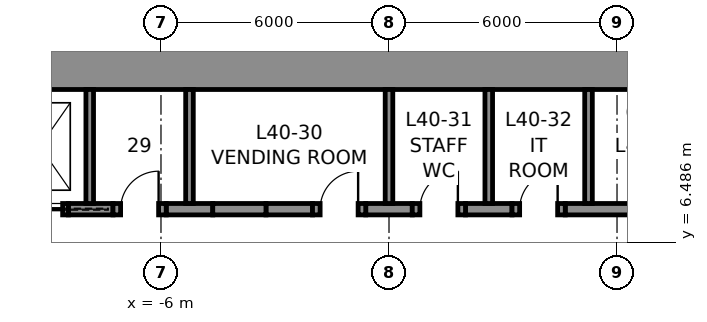
"""IFC4 building model, lengths in metres.
Left out: names, types, materials, properties, quantities, classifications, styles, units other than length and angle.
Written with IfcOpenShell. Run it as: python <this file> out.ifc"""

import sys

from ifc_helpers import new_model, si_unit, direction, frame, frame_2d, origin, place, context, subcontext, project, spatial, rectangle, extrude, element, fill, save


model = new_model("IFC4")
c1 = context("Model", 3, precision=1e-05, world=origin(), true_north=direction((0.0, 1.0)))
c2 = subcontext(c1, "Body", "Model", "MODEL_VIEW")
j1 = project(units=[si_unit("LENGTHUNIT", "METRE"), si_unit("PLANEANGLEUNIT", "RADIAN")], contexts=[c1])
p1 = place(None, origin())
s1 = spatial("IfcSite", under=j1, at=p1, CompositionType="ELEMENT")
p2 = place(p1, origin())
s2 = spatial("IfcBuilding", under=s1, at=p2, CompositionType="ELEMENT")
p3 = place(p2, frame((0.0, 0.0, 187.8)))
s3 = spatial("IfcBuildingStorey", under=s2, at=p3, CompositionType="ELEMENT", Elevation=187.8)
p4 = place(p3, frame((-12.0, 11.25, 0.0), z_axis=(0.0, 0.0, 1.0), x_axis=(1.0, 0.0, 0.0)))
e1 = element("IfcWall", 1, at=p4, inside=s3, PredefinedType="SHEAR", context=c2, shape_type="SweptSolid", body=[
    extrude(rectangle(XDim=24.0, YDim=1.5, at=frame_2d((12.0, 0.0))), origin(), (0.0, 0.0, 1.0), 4.0),
])
p5 = place(p3, frame((-8.438, 7.35, 0.0), z_axis=(0.0, 0.0, 1.0), x_axis=(1.0, 0.0, 0.0)))
e2 = element("IfcWall", 2, at=p5, inside=s3, PredefinedType="SHEAR", context=c2, shape_type="SweptSolid", body=[
    extrude(rectangle(XDim=1.175, YDim=0.3, at=frame_2d((0.587, 0.0))), origin(), (0.0, 0.0, 1.0), 4.0),
])
for number, where, z_axis, x_axis in (
    (3, (-5.863, 7.35, 0.0), (0.0, 0.0, 1.0), (1.0, 0.0, 0.0)),
    (4, (-3.238, 7.35, 0.0), (0.0, 0.0, 1.0), (1.0, 0.0, 0.0)),
    (5, (-0.613, 7.35, 0.0), (0.0, 0.0, 1.0), (1.0, 0.0, 0.0)),
    (6, (2.012, 7.35, 0.0), (0.0, 0.0, 1.0), (1.0, 0.0, 0.0)),
):
    element("IfcWall", number, at=place(p3, frame(where, z_axis=z_axis, x_axis=x_axis)), inside=s3, PredefinedType="SHEAR", context=c2, shape_type="SweptSolid", body=[
        extrude(rectangle(XDim=1.225, YDim=0.3, at=frame_2d((0.613, 0.0))), origin(), (0.0, 0.0, 1.0), 4.0),
    ])
p6 = place(p3, frame((4.637, 7.35, 0.0), z_axis=(0.0, 0.0, 1.0), x_axis=(1.0, 0.0, 0.0)))
e7 = element("IfcWall", 7, at=p6, inside=s3, PredefinedType="SHEAR", context=c2, shape_type="SweptSolid", body=[
    extrude(rectangle(XDim=1.887, YDim=0.3, at=frame_2d((0.944, 0.0))), origin(), (0.0, 0.0, 1.0), 4.0),
])
p7 = place(p3, frame((-9.938, 7.35, 0.0), z_axis=(0.0, 0.0, 1.0), x_axis=(1.0, 0.0, 0.0)))
e8 = element("IfcWall", 8, at=p7, inside=s3, PredefinedType="PARTITIONING", context=c2, shape_type="SweptSolid", body=[
    extrude(rectangle(XDim=1.5, YDim=0.3, at=frame_2d((0.75, 0.0))), origin(), (0.0, 0.0, 1.0), 4.0),
])
p8 = place(p7, frame((0.15, 0.0, 0.0)))
e9 = element("IfcOpeningElement", 9, at=p8, cuts=e8, PredefinedType="OPENING", context=c2, shape_type="SweptSolid", body=[
    extrude(rectangle(XDim=1.2, YDim=2.3, at=frame_2d((0.6, 1.15))), frame((0.0, 0.16, 0.0), z_axis=(0.0, -1.0, 0.0), x_axis=(1.0, 0.0, 0.0)), (0.0, 0.0, 1.0), 0.32),
])
p9 = place(p3, frame((-7.262, 7.35, 0.0), z_axis=(0.0, 0.0, 1.0), x_axis=(1.0, 0.0, 0.0)))
e10 = element("IfcWall", 10, at=p9, inside=s3, PredefinedType="PARTITIONING", context=c2, shape_type="SweptSolid", body=[
    extrude(rectangle(XDim=1.4, YDim=0.3, at=frame_2d((0.7, 0.0))), origin(), (0.0, 0.0, 1.0), 4.0),
])
p10 = place(p9, frame((0.2, 0.0, 0.0)))
e11 = element("IfcOpeningElement", 11, at=p10, cuts=e10, PredefinedType="OPENING", context=c2, shape_type="SweptSolid", body=[
    extrude(rectangle(XDim=1.0, YDim=2.3, at=frame_2d((0.5, 1.15))), frame((0.0, 0.16, 0.0), z_axis=(0.0, -1.0, 0.0), x_axis=(1.0, 0.0, 0.0)), (0.0, 0.0, 1.0), 0.32),
])
p11 = place(p3, frame((-4.637, 7.35, 0.0), z_axis=(0.0, 0.0, 1.0), x_axis=(1.0, 0.0, 0.0)))
e12 = element("IfcWall", 12, at=p11, inside=s3, PredefinedType="PARTITIONING", context=c2, shape_type="SweptSolid", body=[
    extrude(rectangle(XDim=1.4, YDim=0.3, at=frame_2d((0.7, 0.0))), origin(), (0.0, 0.0, 1.0), 4.0),
])
p12 = place(p3, frame((-2.012, 7.35, 0.0), z_axis=(0.0, 0.0, 1.0), x_axis=(1.0, 0.0, 0.0)))
e13 = element("IfcWall", 13, at=p12, inside=s3, PredefinedType="PARTITIONING", context=c2, shape_type="SweptSolid", body=[
    extrude(rectangle(XDim=1.4, YDim=0.3, at=frame_2d((0.7, 0.0))), origin(), (0.0, 0.0, 1.0), 4.0),
])
p13 = place(p12, frame((0.2, 0.0, 0.0)))
e14 = element("IfcOpeningElement", 14, at=p13, cuts=e13, PredefinedType="OPENING", context=c2, shape_type="SweptSolid", body=[
    extrude(rectangle(XDim=1.0, YDim=2.3, at=frame_2d((0.5, 1.15))), frame((0.0, 0.16, 0.0), z_axis=(0.0, -1.0, 0.0), x_axis=(1.0, 0.0, 0.0)), (0.0, 0.0, 1.0), 0.32),
])
p14 = place(p3, frame((0.613, 7.35, 0.0), z_axis=(0.0, 0.0, 1.0), x_axis=(1.0, 0.0, 0.0)))
e15 = element("IfcWall", 15, at=p14, inside=s3, PredefinedType="PARTITIONING", context=c2, shape_type="SweptSolid", body=[
    extrude(rectangle(XDim=1.4, YDim=0.3, at=frame_2d((0.7, 0.0))), origin(), (0.0, 0.0, 1.0), 4.0),
])
p15 = place(p14, frame((0.2, 0.0, 0.0)))
e16 = element("IfcOpeningElement", 16, at=p15, cuts=e15, PredefinedType="OPENING", context=c2, shape_type="SweptSolid", body=[
    extrude(rectangle(XDim=1.0, YDim=2.3, at=frame_2d((0.5, 1.15))), frame((0.0, 0.16, 0.0), z_axis=(0.0, -1.0, 0.0), x_axis=(1.0, 0.0, 0.0)), (0.0, 0.0, 1.0), 0.32),
])
p16 = place(p3, frame((3.238, 7.35, 0.0), z_axis=(0.0, 0.0, 1.0), x_axis=(1.0, 0.0, 0.0)))
e17 = element("IfcWall", 17, at=p16, inside=s3, PredefinedType="PARTITIONING", context=c2, shape_type="SweptSolid", body=[
    extrude(rectangle(XDim=1.4, YDim=0.3, at=frame_2d((0.7, 0.0))), origin(), (0.0, 0.0, 1.0), 4.0),
])
p17 = place(p16, frame((0.2, 0.0, 0.0)))
e18 = element("IfcOpeningElement", 18, at=p17, cuts=e17, PredefinedType="OPENING", context=c2, shape_type="SweptSolid", body=[
    extrude(rectangle(XDim=1.0, YDim=2.3, at=frame_2d((0.5, 1.15))), frame((0.0, 0.16, 0.0), z_axis=(0.0, -1.0, 0.0), x_axis=(1.0, 0.0, 0.0)), (0.0, 0.0, 1.0), 0.32),
])
for number, where, z_axis, x_axis in (
    (19, (-7.875, 7.5, 0.0), (0.0, 0.0, 1.0), (0.0, 1.0, 0.0)),
    (20, (-5.25, 7.5, 0.0), (0.0, 0.0, 1.0), (0.0, 1.0, 0.0)),
    (21, (0.0, 7.5, 0.0), (0.0, 0.0, 1.0), (0.0, 1.0, 0.0)),
    (22, (2.625, 7.5, 0.0), (0.0, 0.0, 1.0), (0.0, 1.0, 0.0)),
    (23, (5.25, 7.5, 0.0), (0.0, 0.0, 1.0), (0.0, 1.0, 0.0)),
):
    element("IfcWall", number, at=place(p3, frame(where, z_axis=z_axis, x_axis=x_axis)), inside=s3, PredefinedType="PARTITIONING", context=c2, shape_type="SweptSolid", body=[
        extrude(rectangle(XDim=3.0, YDim=0.2, at=frame_2d((1.5, 0.0))), origin(), (0.0, 0.0, 1.0), 4.0),
    ])
p18 = place(p10, origin())
e24 = element("IfcDoor", 24, at=p18, inside=s3, OperationType="SINGLE_SWING_RIGHT", PredefinedType="DOOR", context=c2, shape_type="SweptSolid", body=[
    extrude(rectangle(XDim=1.0, YDim=2.3, at=frame_2d((0.5, 1.15))), frame((0.0, 0.025, 0.0), z_axis=(0.0, -1.0, 0.0), x_axis=(1.0, 0.0, 0.0)), (0.0, 0.0, 1.0), 0.05),
])
fill(e11, e24)
p19 = place(p13, origin())
e25 = element("IfcDoor", 25, at=p19, inside=s3, OperationType="SINGLE_SWING_RIGHT", PredefinedType="DOOR", context=c2, shape_type="SweptSolid", body=[
    extrude(rectangle(XDim=1.0, YDim=2.3, at=frame_2d((0.5, 1.15))), frame((0.0, 0.025, 0.0), z_axis=(0.0, -1.0, 0.0), x_axis=(1.0, 0.0, 0.0)), (0.0, 0.0, 1.0), 0.05),
])
fill(e14, e25)
p20 = place(p15, origin())
e26 = element("IfcDoor", 26, at=p20, inside=s3, OperationType="SINGLE_SWING_RIGHT", PredefinedType="DOOR", context=c2, shape_type="SweptSolid", body=[
    extrude(rectangle(XDim=1.0, YDim=2.3, at=frame_2d((0.5, 1.15))), frame((0.0, 0.025, 0.0), z_axis=(0.0, -1.0, 0.0), x_axis=(1.0, 0.0, 0.0)), (0.0, 0.0, 1.0), 0.05),
])
fill(e16, e26)
p21 = place(p17, origin())
e27 = element("IfcDoor", 27, at=p21, inside=s3, OperationType="SINGLE_SWING_RIGHT", PredefinedType="DOOR", context=c2, shape_type="SweptSolid", body=[
    extrude(rectangle(XDim=1.0, YDim=2.3, at=frame_2d((0.5, 1.15))), frame((0.0, 0.025, 0.0), z_axis=(0.0, -1.0, 0.0), x_axis=(1.0, 0.0, 0.0)), (0.0, 0.0, 1.0), 0.05),
])
fill(e18, e27)
p22 = place(p8, frame((1.2, 0.0, 0.0), z_axis=(0.0, 0.0, 1.0), x_axis=(-1.0, 0.0, 0.0)))
e28 = element("IfcDoor", 28, at=p22, inside=s3, OperationType="SLIDING_TO_LEFT", PredefinedType="DOOR", context=c2, shape_type="SweptSolid", body=[
    extrude(rectangle(XDim=1.2, YDim=2.3, at=frame_2d((0.6, 1.15))), frame((0.0, 0.025, 0.0), z_axis=(0.0, -1.0, 0.0), x_axis=(1.0, 0.0, 0.0)), (0.0, 0.0, 1.0), 0.05),
])
fill(e9, e28)
save(model, sys.argv[1])
